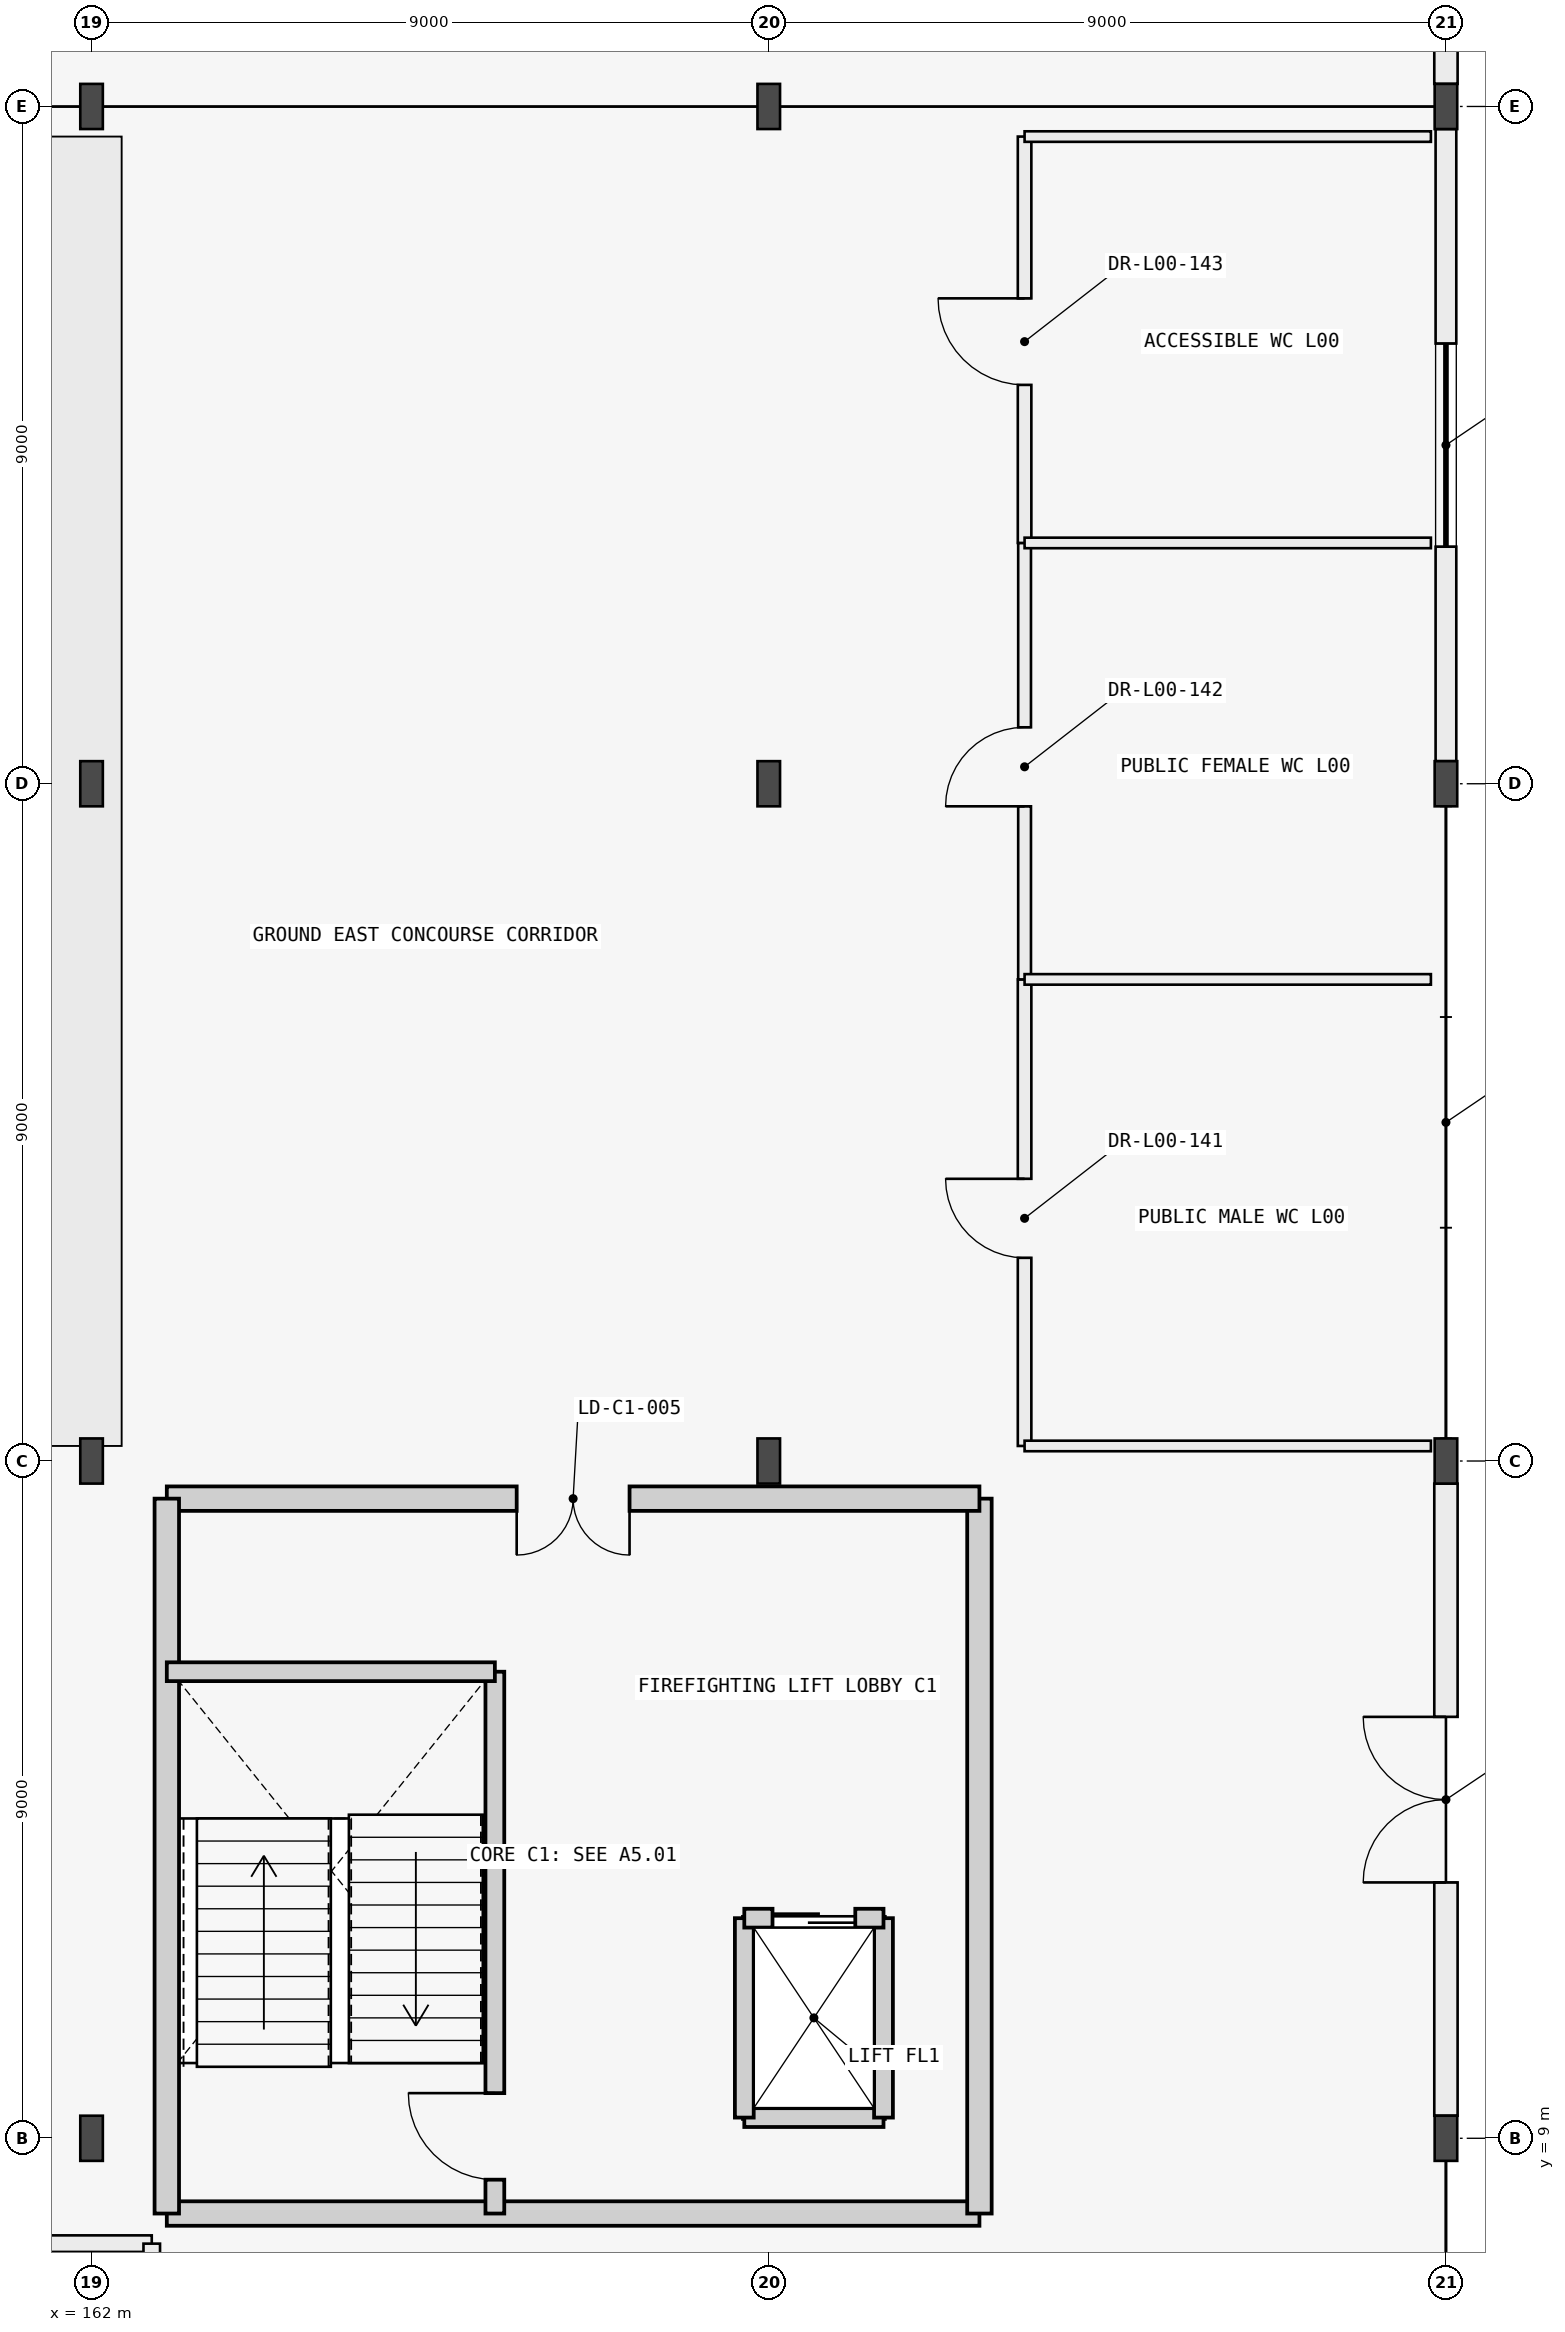
"""IFC4 building model, lengths in metres.
Left out: names, types, materials, properties, quantities, classifications, styles, units other than length and angle.
Written with IfcOpenShell. Run it as: python <this file> out.ifc"""

import sys

from ifc_helpers import new_model, si_unit, direction, frame, frame_2d, origin, origin_2d, place, context, subcontext, project, spatial, rectangle, i_section, extrude, element, fill, save


model = new_model("IFC4")
c1 = context("Model", 3, precision=1e-05, world=origin(), true_north=direction((0.0, 1.0)))
c2 = subcontext(c1, "Body", "Model", "MODEL_VIEW")
j1 = project(units=[si_unit("LENGTHUNIT", "METRE"), si_unit("PLANEANGLEUNIT", "RADIAN")], contexts=[c1])
p1 = place(None, origin())
s1 = spatial("IfcSite", under=j1, at=p1, CompositionType="ELEMENT")
p2 = place(p1, origin())
s2 = spatial("IfcBuilding", under=s1, at=p2, CompositionType="ELEMENT")
p3 = place(p2, origin())
s3 = spatial("IfcBuildingStorey", under=s2, at=p3, CompositionType="ELEMENT", Elevation=0.0)
for number, where, z_axis, x_axis in (
    (1, (162.0, 9.0, 0.0), (0.0, 0.0, 1.0), (1.0, 0.0, 0.0)),
    (2, (180.0, 9.0, 0.0), (0.0, 0.0, 1.0), (1.0, 0.0, 0.0)),
    (3, (162.0, 18.0, 0.0), (0.0, 0.0, 1.0), (1.0, 0.0, 0.0)),
    (4, (171.0, 18.0, 0.0), (0.0, 0.0, 1.0), (1.0, 0.0, 0.0)),
    (5, (180.0, 18.0, 0.0), (0.0, 0.0, 1.0), (1.0, 0.0, 0.0)),
    (6, (162.0, 27.0, 0.0), (0.0, 0.0, 1.0), (1.0, 0.0, 0.0)),
    (7, (171.0, 27.0, 0.0), (0.0, 0.0, 1.0), (1.0, 0.0, 0.0)),
    (8, (180.0, 27.0, 0.0), (0.0, 0.0, 1.0), (1.0, 0.0, 0.0)),
    (9, (162.0, 36.0, 0.0), (0.0, 0.0, 1.0), (1.0, 0.0, 0.0)),
    (10, (171.0, 36.0, 0.0), (0.0, 0.0, 1.0), (1.0, 0.0, 0.0)),
    (11, (180.0, 36.0, 0.0), (0.0, 0.0, 1.0), (1.0, 0.0, 0.0)),
):
    element("IfcColumn", number, at=place(p3, frame(where, z_axis=z_axis, x_axis=x_axis)), inside=s3, PredefinedType="COLUMN", context=c2, shape_type="SweptSolid", body=[
        extrude(i_section(OverallWidth=0.3, OverallDepth=0.6, WebThickness=0.015, FlangeThickness=0.03, FilletRadius=0.027, at=origin_2d()), origin(), (0.0, 0.0, 1.0), 4.2),
    ])
p4 = place(p3, frame((180.0, 9.3, 0.0), z_axis=(0.0, 0.0, 1.0), x_axis=(0.0, 1.0, 0.0)))
e12 = element("IfcWall", 12, at=p4, inside=s3, PredefinedType="STANDARD", context=c2, shape_type="SweptSolid", body=[
    extrude(rectangle(XDim=8.4, YDim=0.31, at=frame_2d((4.2, 0.0))), origin(), (0.0, 0.0, 1.0), 3.625),
])
p5 = place(p4, frame((3.1, 0.0, 0.0)))
e13 = element("IfcOpeningElement", 13, at=p5, cuts=e12, PredefinedType="OPENING", context=c2, shape_type="SweptSolid", body=[
    extrude(rectangle(XDim=2.2, YDim=2.4, at=frame_2d((1.1, 1.2))), frame((0.0, 0.165, 0.0), z_axis=(0.0, -1.0, 0.0), x_axis=(1.0, 0.0, 0.0)), (0.0, 0.0, 1.0), 0.33),
])
p6 = place(p3, frame((180.0, 27.3, 0.0), z_axis=(0.0, 0.0, 1.0), x_axis=(0.0, 1.0, 0.0)))
e14 = element("IfcWall", 14, at=p6, inside=s3, PredefinedType="POLYGONAL", context=c2, shape_type="SweptSolid", body=[
    extrude(rectangle(XDim=8.4, YDim=0.275, at=frame_2d((4.2, 0.0))), origin(), (0.0, 0.0, 1.0), 3.625),
])
p7 = place(p6, frame((2.85, 0.0, 0.95)))
e15 = element("IfcOpeningElement", 15, at=p7, cuts=e14, PredefinedType="OPENING", context=c2, shape_type="SweptSolid", body=[
    extrude(rectangle(XDim=2.7, YDim=1.6, at=frame_2d((1.35, 0.8))), frame((0.0, 0.147, 0.0), z_axis=(0.0, -1.0, 0.0), x_axis=(1.0, 0.0, 0.0)), (0.0, 0.0, 1.0), 0.295),
])
p8 = place(p3, frame((180.0, 36.3, 0.0), z_axis=(0.0, 0.0, 1.0), x_axis=(0.0, 1.0, 0.0)))
e16 = element("IfcWall", 16, at=p8, inside=s3, PredefinedType="STANDARD", context=c2, shape_type="SweptSolid", body=[
    extrude(rectangle(XDim=8.4, YDim=0.31, at=frame_2d((4.2, 0.0))), origin(), (0.0, 0.0, 1.0), 3.625),
])
p9 = place(p8, frame((3.25, 0.0, 0.0)))
e17 = element("IfcOpeningElement", 17, at=p9, cuts=e16, PredefinedType="OPENING", context=c2, shape_type="SweptSolid", body=[
    extrude(rectangle(XDim=1.9, YDim=2.25, at=frame_2d((0.95, 1.125))), frame((0.0, 0.165, 0.0), z_axis=(0.0, -1.0, 0.0), x_axis=(1.0, 0.0, 0.0)), (0.0, 0.0, 1.0), 0.33),
])
p10 = place(p3, frame((163.0, 8.0, 0.0), z_axis=(0.0, 0.0, 1.0), x_axis=(1.0, 0.0, 0.0)))
e18 = element("IfcWall", 18, at=p10, inside=s3, PredefinedType="SHEAR", context=c2, shape_type="SweptSolid", body=[
    extrude(rectangle(XDim=10.8, YDim=0.325, at=frame_2d((5.4, 0.0))), origin(), (0.0, 0.0, 1.0), 3.95),
])
p11 = place(p3, frame((173.8, 8.0, 0.0), z_axis=(0.0, 0.0, 1.0), x_axis=(0.0, 1.0, 0.0)))
e19 = element("IfcWall", 19, at=p11, inside=s3, PredefinedType="SHEAR", context=c2, shape_type="SweptSolid", body=[
    extrude(rectangle(XDim=9.5, YDim=0.325, at=frame_2d((4.75, 0.0))), origin(), (0.0, 0.0, 1.0), 3.95),
])
p12 = place(p3, frame((173.8, 17.5, 0.0), z_axis=(0.0, 0.0, 1.0), x_axis=(-1.0, 0.0, 0.0)))
e20 = element("IfcWall", 20, at=p12, inside=s3, PredefinedType="SHEAR", context=c2, shape_type="SweptSolid", body=[
    extrude(rectangle(XDim=10.8, YDim=0.325, at=frame_2d((5.4, 0.0))), origin(), (0.0, 0.0, 1.0), 3.95),
])
p13 = place(p12, frame((4.65, 0.0, 0.0)))
e21 = element("IfcOpeningElement", 21, at=p13, cuts=e20, PredefinedType="OPENING", context=c2, shape_type="SweptSolid", body=[
    extrude(rectangle(XDim=1.5, YDim=2.2, at=frame_2d((0.75, 1.1))), frame((0.0, 0.172, 0.0), z_axis=(0.0, -1.0, 0.0), x_axis=(1.0, 0.0, 0.0)), (0.0, 0.0, 1.0), 0.345),
])
p14 = place(p3, frame((163.0, 17.5, 0.0), z_axis=(0.0, 0.0, 1.0), x_axis=(0.0, -1.0, 0.0)))
e22 = element("IfcWall", 22, at=p14, inside=s3, PredefinedType="SHEAR", context=c2, shape_type="SweptSolid", body=[
    extrude(rectangle(XDim=9.5, YDim=0.325, at=frame_2d((4.75, 0.0))), origin(), (0.0, 0.0, 1.0), 3.95),
])
p15 = place(p3, frame((167.36, 8.0, 0.0), z_axis=(0.0, 0.0, 1.0), x_axis=(0.0, 1.0, 0.0)))
e23 = element("IfcWall", 23, at=p15, inside=s3, PredefinedType="SHEAR", context=c2, shape_type="SweptSolid", body=[
    extrude(rectangle(XDim=7.2, YDim=0.25, at=frame_2d((3.6, 0.0))), origin(), (0.0, 0.0, 1.0), 3.95),
])
p16 = place(p15, frame((0.45, 0.0, 0.0)))
e24 = element("IfcOpeningElement", 24, at=p16, cuts=e23, PredefinedType="OPENING", context=c2, shape_type="SweptSolid", body=[
    extrude(rectangle(XDim=1.15, YDim=2.15, at=frame_2d((0.575, 1.075))), frame((0.0, 0.135, 0.0), z_axis=(0.0, -1.0, 0.0), x_axis=(1.0, 0.0, 0.0)), (0.0, 0.0, 1.0), 0.27),
])
p17 = place(p3, frame((163.0, 15.2, 0.0), z_axis=(0.0, 0.0, 1.0), x_axis=(1.0, 0.0, 0.0)))
e25 = element("IfcWall", 25, at=p17, inside=s3, PredefinedType="SHEAR", context=c2, shape_type="SweptSolid", body=[
    extrude(rectangle(XDim=4.36, YDim=0.25, at=frame_2d((2.18, 0.0))), origin(), (0.0, 0.0, 1.0), 3.95),
])
p18 = place(p3, frame((170.675, 9.275, 0.0), z_axis=(0.0, 0.0, 1.0), x_axis=(1.0, 0.0, 0.0)))
e26 = element("IfcWall", 26, at=p18, inside=s3, PredefinedType="SHEAR", context=c2, shape_type="SweptSolid", body=[
    extrude(rectangle(XDim=1.85, YDim=0.25, at=frame_2d((0.925, 0.0))), origin(), (0.0, 0.0, 1.0), 3.95),
])
for number, where, z_axis, x_axis in (
    (27, (170.675, 9.275, 0.0), (0.0, 0.0, 1.0), (0.0, 1.0, 0.0)),
    (28, (172.525, 9.275, 0.0), (0.0, 0.0, 1.0), (0.0, 1.0, 0.0)),
):
    element("IfcWall", number, at=place(p3, frame(where, z_axis=z_axis, x_axis=x_axis)), inside=s3, PredefinedType="SHEAR", context=c2, shape_type="SweptSolid", body=[
        extrude(rectangle(XDim=2.65, YDim=0.25, at=frame_2d((1.325, 0.0))), origin(), (0.0, 0.0, 1.0), 3.95),
    ])
p19 = place(p3, frame((170.675, 11.925, 0.0), z_axis=(0.0, 0.0, 1.0), x_axis=(1.0, 0.0, 0.0)))
e29 = element("IfcWall", 29, at=p19, inside=s3, PredefinedType="SHEAR", context=c2, shape_type="SweptSolid", body=[
    extrude(rectangle(XDim=1.85, YDim=0.25, at=frame_2d((0.925, 0.0))), origin(), (0.0, 0.0, 1.0), 3.95),
])
p20 = place(p19, frame((0.375, 0.0, 0.0)))
e30 = element("IfcOpeningElement", 30, at=p20, cuts=e29, PredefinedType="OPENING", context=c2, shape_type="SweptSolid", body=[
    extrude(rectangle(XDim=1.1, YDim=2.15, at=frame_2d((0.55, 1.075))), frame((0.0, 0.135, 0.0), z_axis=(0.0, -1.0, 0.0), x_axis=(1.0, 0.0, 0.0)), (0.0, 0.0, 1.0), 0.27),
])
p21 = place(p3, frame((153.2, 7.6, 0.0), z_axis=(0.0, 0.0, 1.0), x_axis=(1.0, 0.0, 0.0)))
e31 = element("IfcWall", 31, at=p21, inside=s3, PredefinedType="PARTITIONING", context=c2, shape_type="SweptSolid", body=[
    extrude(rectangle(XDim=9.6, YDim=0.22, at=frame_2d((4.8, 0.0))), origin(), (0.0, 0.0, 1.0), 3.95),
])
p22 = place(p21, frame((3.8, 0.0, 0.0)))
e32 = element("IfcOpeningElement", 32, at=p22, cuts=e31, PredefinedType="OPENING", context=c2, shape_type="SweptSolid", body=[
    extrude(rectangle(XDim=1.25, YDim=2.2, at=frame_2d((0.625, 1.1))), frame((0.0, 0.12, 0.0), z_axis=(0.0, -1.0, 0.0), x_axis=(1.0, 0.0, 0.0)), (0.0, 0.0, 1.0), 0.24),
])
p23 = place(p3, frame((162.8, 0.2, 0.0), z_axis=(0.0, 0.0, 1.0), x_axis=(0.0, 1.0, 0.0)))
e33 = element("IfcWall", 33, at=p23, inside=s3, PredefinedType="PARTITIONING", context=c2, shape_type="SweptSolid", body=[
    extrude(rectangle(XDim=7.4, YDim=0.22, at=frame_2d((3.7, 0.0))), origin(), (0.0, 0.0, 1.0), 3.95),
])
p24 = place(p3, frame((174.4, 18.2, 0.0), z_axis=(0.0, 0.0, 1.0), x_axis=(0.0, 1.0, 0.0)))
e34 = element("IfcWall", 34, at=p24, inside=s3, PredefinedType="PARTITIONING", context=c2, shape_type="SweptSolid", body=[
    extrude(rectangle(XDim=6.2, YDim=0.18, at=frame_2d((3.1, 0.0))), origin(), (0.0, 0.0, 1.0), 3.625),
])
p25 = place(p24, frame((2.5, 0.0, 0.0)))
e35 = element("IfcOpeningElement", 35, at=p25, cuts=e34, PredefinedType="OPENING", context=c2, shape_type="SweptSolid", body=[
    extrude(rectangle(XDim=1.05, YDim=2.1, at=frame_2d((0.525, 1.05))), frame((0.0, 0.1, 0.0), z_axis=(0.0, -1.0, 0.0), x_axis=(1.0, 0.0, 0.0)), (0.0, 0.0, 1.0), 0.2),
])
p26 = place(p3, frame((174.4, 24.4, 0.0), z_axis=(0.0, 0.0, 1.0), x_axis=(0.0, 1.0, 0.0)))
e36 = element("IfcWall", 36, at=p26, inside=s3, PredefinedType="PARTITIONING", context=c2, shape_type="SweptSolid", body=[
    extrude(rectangle(XDim=5.8, YDim=0.17, at=frame_2d((2.9, 0.0))), origin(), (0.0, 0.0, 1.0), 3.625),
])
p27 = place(p26, frame((2.3, 0.0, 0.0)))
e37 = element("IfcOpeningElement", 37, at=p27, cuts=e36, PredefinedType="OPENING", context=c2, shape_type="SweptSolid", body=[
    extrude(rectangle(XDim=1.05, YDim=2.1, at=frame_2d((0.525, 1.05))), frame((0.0, 0.095, 0.0), z_axis=(0.0, -1.0, 0.0), x_axis=(1.0, 0.0, 0.0)), (0.0, 0.0, 1.0), 0.19),
])
p28 = place(p3, frame((174.4, 30.2, 0.0), z_axis=(0.0, 0.0, 1.0), x_axis=(0.0, 1.0, 0.0)))
e38 = element("IfcWall", 38, at=p28, inside=s3, PredefinedType="PARTITIONING", context=c2, shape_type="SweptSolid", body=[
    extrude(rectangle(XDim=5.4, YDim=0.18, at=frame_2d((2.7, 0.0))), origin(), (0.0, 0.0, 1.0), 3.625),
])
p29 = place(p28, frame((2.1, 0.0, 0.0)))
e39 = element("IfcOpeningElement", 39, at=p29, cuts=e38, PredefinedType="OPENING", context=c2, shape_type="SweptSolid", body=[
    extrude(rectangle(XDim=1.15, YDim=2.15, at=frame_2d((0.575, 1.075))), frame((0.0, 0.1, 0.0), z_axis=(0.0, -1.0, 0.0), x_axis=(1.0, 0.0, 0.0)), (0.0, 0.0, 1.0), 0.2),
])
p30 = place(p3, frame((174.4, 18.2, 0.0), z_axis=(0.0, 0.0, 1.0), x_axis=(1.0, 0.0, 0.0)))
e40 = element("IfcWall", 40, at=p30, inside=s3, PredefinedType="PARTITIONING", context=c2, shape_type="SweptSolid", body=[
    extrude(rectangle(XDim=5.4, YDim=0.14, at=frame_2d((2.7, 0.0))), origin(), (0.0, 0.0, 1.0), 3.425),
])
for number, where, z_axis, x_axis in (
    (41, (174.4, 24.4, 0.0), (0.0, 0.0, 1.0), (1.0, 0.0, 0.0)),
    (42, (174.4, 30.2, 0.0), (0.0, 0.0, 1.0), (1.0, 0.0, 0.0)),
):
    element("IfcWall", number, at=place(p3, frame(where, z_axis=z_axis, x_axis=x_axis)), inside=s3, PredefinedType="PARTITIONING", context=c2, shape_type="SweptSolid", body=[
        extrude(rectangle(XDim=5.4, YDim=0.14, at=frame_2d((2.7, 0.0))), origin(), (0.0, 0.0, 1.0), 3.95),
    ])
p31 = place(p3, frame((174.4, 35.6, 0.0), z_axis=(0.0, 0.0, 1.0), x_axis=(1.0, 0.0, 0.0)))
e43 = element("IfcWall", 43, at=p31, inside=s3, PredefinedType="PARTITIONING", context=c2, shape_type="SweptSolid", body=[
    extrude(rectangle(XDim=5.4, YDim=0.14, at=frame_2d((2.7, 0.0))), origin(), (0.0, 0.0, 1.0), 3.425),
])
p32 = place(p5, frame((2.2, 0.0, 0.0), z_axis=(0.0, 0.0, 1.0), x_axis=(-1.0, 0.0, 0.0)))
e44 = element("IfcDoor", 44, at=p32, inside=s3, OperationType="DOUBLE_DOOR_SINGLE_SWING", PredefinedType="DOOR", context=c2, shape_type="SweptSolid", body=[
    extrude(rectangle(XDim=2.2, YDim=2.4, at=frame_2d((1.1, 1.2))), frame((0.0, 0.025, 0.0), z_axis=(0.0, -1.0, 0.0), x_axis=(1.0, 0.0, 0.0)), (0.0, 0.0, 1.0), 0.05),
])
fill(e13, e44)
p33 = place(p7, origin())
e45 = element("IfcWindow", 45, at=p33, inside=s3, PartitioningType="SINGLE_PANEL", PredefinedType="WINDOW", context=c2, shape_type="SweptSolid", body=[
    extrude(rectangle(XDim=2.7, YDim=1.6, at=frame_2d((1.35, 0.8))), frame((0.0, 0.03, 0.0), z_axis=(0.0, -1.0, 0.0), x_axis=(1.0, 0.0, 0.0)), (0.0, 0.0, 1.0), 0.06),
])
fill(e15, e45)
p34 = place(p16, origin())
e46 = element("IfcDoor", 46, at=p34, inside=s3, OperationType="SINGLE_SWING_RIGHT", PredefinedType="DOOR", context=c2, shape_type="SweptSolid", body=[
    extrude(rectangle(XDim=1.15, YDim=2.15, at=frame_2d((0.575, 1.075))), frame((0.0, 0.025, 0.0), z_axis=(0.0, -1.0, 0.0), x_axis=(1.0, 0.0, 0.0)), (0.0, 0.0, 1.0), 0.05),
])
fill(e24, e46)
p35 = place(p13, origin())
e47 = element("IfcDoor", 47, at=p35, inside=s3, OperationType="DOUBLE_DOOR_SINGLE_SWING", PredefinedType="DOOR", context=c2, shape_type="SweptSolid", body=[
    extrude(rectangle(XDim=1.5, YDim=2.2, at=frame_2d((0.75, 1.1))), frame((0.0, 0.025, 0.0), z_axis=(0.0, -1.0, 0.0), x_axis=(1.0, 0.0, 0.0)), (0.0, 0.0, 1.0), 0.05),
])
fill(e21, e47)
p36 = place(p20, origin())
e48 = element("IfcDoor", 48, at=p36, inside=s3, OperationType="DOUBLE_DOOR_SLIDING", PredefinedType="USERDEFINED", context=c2, shape_type="SweptSolid", body=[
    extrude(rectangle(XDim=1.1, YDim=2.15, at=frame_2d((0.55, 1.075))), frame((0.0, 0.025, 0.0), z_axis=(0.0, -1.0, 0.0), x_axis=(1.0, 0.0, 0.0)), (0.0, 0.0, 1.0), 0.05),
])
fill(e30, e48)
p37 = place(p25, origin())
e49 = element("IfcDoor", 49, at=p37, inside=s3, OperationType="SINGLE_SWING_RIGHT", PredefinedType="DOOR", context=c2, shape_type="SweptSolid", body=[
    extrude(rectangle(XDim=1.05, YDim=2.1, at=frame_2d((0.525, 1.05))), frame((0.0, 0.025, 0.0), z_axis=(0.0, -1.0, 0.0), x_axis=(1.0, 0.0, 0.0)), (0.0, 0.0, 1.0), 0.05),
])
fill(e35, e49)
p38 = place(p27, origin())
e50 = element("IfcDoor", 50, at=p38, inside=s3, OperationType="SINGLE_SWING_LEFT", PredefinedType="DOOR", context=c2, shape_type="SweptSolid", body=[
    extrude(rectangle(XDim=1.05, YDim=2.1, at=frame_2d((0.525, 1.05))), frame((0.0, 0.025, 0.0), z_axis=(0.0, -1.0, 0.0), x_axis=(1.0, 0.0, 0.0)), (0.0, 0.0, 1.0), 0.05),
])
fill(e37, e50)
p39 = place(p29, origin())
e51 = element("IfcDoor", 51, at=p39, inside=s3, OperationType="SINGLE_SWING_RIGHT", PredefinedType="DOOR", context=c2, shape_type="SweptSolid", body=[
    extrude(rectangle(XDim=1.15, YDim=2.15, at=frame_2d((0.575, 1.075))), frame((0.0, 0.025, 0.0), z_axis=(0.0, -1.0, 0.0), x_axis=(1.0, 0.0, 0.0)), (0.0, 0.0, 1.0), 0.05),
])
fill(e39, e51)
save(model, sys.argv[1])
